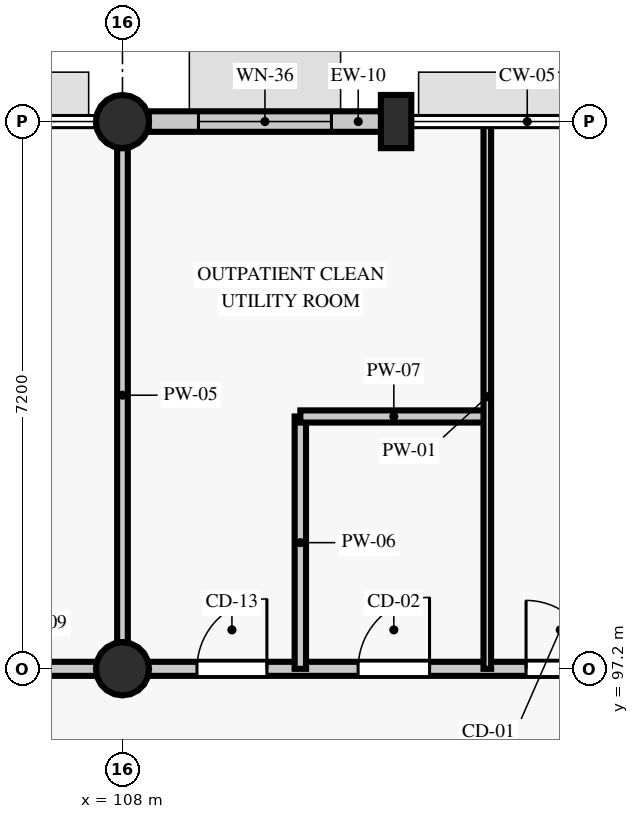
"""IFC4 building model, lengths in metres.
Left out: names, types, materials, properties, quantities, classifications, styles, units other than length and angle.
Written with IfcOpenShell. Run it as: python <this file> out.ifc"""

import sys

from ifc_helpers import new_model, si_unit, direction, frame, frame_2d, origin, origin_2d, place, context, subcontext, project, spatial, rectangle, circle, extrude, element, fill, save


model = new_model("IFC4")
c1 = context("Model", 3, precision=1e-05, world=origin(), true_north=direction((0.0, 1.0)))
c2 = subcontext(c1, "Body", "Model", "MODEL_VIEW")
j1 = project(units=[si_unit("LENGTHUNIT", "METRE"), si_unit("PLANEANGLEUNIT", "RADIAN")], contexts=[c1])
p1 = place(None, origin())
s1 = spatial("IfcSite", under=j1, at=p1, CompositionType="ELEMENT")
p2 = place(p1, origin())
s2 = spatial("IfcBuilding", under=s1, at=p2, CompositionType="ELEMENT")
p3 = place(p2, origin())
s3 = spatial("IfcBuildingStorey", under=s2, at=p3, CompositionType="ELEMENT", Elevation=0.0)
for number, where, z_axis, x_axis in (
    (1, (108.0, 97.2, 0.0), (0.0, 0.0, 1.0), (1.0, 0.0, 0.0)),
    (2, (108.0, 104.4, 0.0), (0.0, 0.0, 1.0), (1.0, 0.0, 0.0)),
):
    element("IfcColumn", number, at=place(p3, frame(where, z_axis=z_axis, x_axis=x_axis)), inside=s3, PredefinedType="COLUMN", context=c2, shape_type="SweptSolid", body=[
        extrude(circle(Radius=0.35, at=origin_2d()), origin(), (0.0, 0.0, 1.0), 4.535),
    ])
p4 = place(p3, frame((111.6, 104.4, 0.0), z_axis=(0.0, 0.0, 1.0), x_axis=(1.0, 0.0, 0.0)))
e3 = element("IfcColumn", 3, at=p4, inside=s3, PredefinedType="PILASTER", context=c2, shape_type="SweptSolid", body=[
    extrude(rectangle(XDim=0.4, YDim=0.7, at=origin_2d()), origin(), (0.0, 0.0, 1.0), 4.535),
])
p5 = place(p3, frame((111.404, 104.4, 0.0), z_axis=(0.0, 0.0, 1.0), x_axis=(-1.0, 0.0, 0.0)))
e4 = element("IfcWall", 4, at=p5, inside=s3, PredefinedType="STANDARD", context=c2, shape_type="SweptSolid", body=[
    extrude(rectangle(XDim=3.059, YDim=0.27, at=frame_2d((1.53, 0.0))), origin(), (0.0, 0.0, 1.0), 2.9),
])
p6 = place(p5, frame((0.655, 0.0, 0.9)))
e5 = element("IfcOpeningElement", 5, at=p6, cuts=e4, PredefinedType="OPENING", context=c2, shape_type="SweptSolid", body=[
    extrude(rectangle(XDim=1.75, YDim=1.66, at=frame_2d((0.875, 0.83))), frame((0.0, 0.145, 0.0), z_axis=(0.0, -1.0, 0.0), x_axis=(1.0, 0.0, 0.0)), (0.0, 0.0, 1.0), 0.29),
])
p7 = place(p3, frame((93.95, 97.2, 0.0), z_axis=(0.0, 0.0, 1.0), x_axis=(1.0, 0.0, 0.0)))
e6 = element("IfcWall", 6, at=p7, inside=s3, PredefinedType="PARTITIONING", context=c2, shape_type="SweptSolid", body=[
    extrude(rectangle(XDim=28.1, YDim=0.185, at=frame_2d((14.05, 0.0))), origin(), (0.0, 0.0, 1.0), 3.785),
])
p8 = place(p7, frame((2.837, 0.0, 0.0)))
e7 = element("IfcOpeningElement", 7, at=p8, cuts=e6, PredefinedType="OPENING", context=c2, shape_type="SweptSolid", body=[
    extrude(rectangle(XDim=1.05, YDim=2.13, at=frame_2d((0.525, 1.065))), frame((0.0, 0.103, 0.0), z_axis=(0.0, -1.0, 0.0), x_axis=(1.0, 0.0, 0.0)), (0.0, 0.0, 1.0), 0.205),
])
p9 = place(p7, frame((7.679, 0.0, 0.0)))
e8 = element("IfcOpeningElement", 8, at=p9, cuts=e6, PredefinedType="OPENING", context=c2, shape_type="SweptSolid", body=[
    extrude(rectangle(XDim=1.1, YDim=2.13, at=frame_2d((0.55, 1.065))), frame((0.0, 0.103, 0.0), z_axis=(0.0, -1.0, 0.0), x_axis=(1.0, 0.0, 0.0)), (0.0, 0.0, 1.0), 0.205),
])
p10 = place(p7, frame((9.747, 0.0, 0.0)))
e9 = element("IfcOpeningElement", 9, at=p10, cuts=e6, PredefinedType="OPENING", context=c2, shape_type="SweptSolid", body=[
    extrude(rectangle(XDim=1.15, YDim=2.13, at=frame_2d((0.575, 1.065))), frame((0.0, 0.103, 0.0), z_axis=(0.0, -1.0, 0.0), x_axis=(1.0, 0.0, 0.0)), (0.0, 0.0, 1.0), 0.205),
])
p11 = place(p7, frame((15.03, 0.0, 0.0)))
e10 = element("IfcOpeningElement", 10, at=p11, cuts=e6, PredefinedType="OPENING", context=c2, shape_type="SweptSolid", body=[
    extrude(rectangle(XDim=0.92, YDim=2.18, at=frame_2d((0.46, 1.09))), frame((0.0, 0.103, 0.0), z_axis=(0.0, -1.0, 0.0), x_axis=(1.0, 0.0, 0.0)), (0.0, 0.0, 1.0), 0.205),
])
p12 = place(p7, frame((17.15, 0.0, 0.0)))
e11 = element("IfcOpeningElement", 11, at=p12, cuts=e6, PredefinedType="OPENING", context=c2, shape_type="SweptSolid", body=[
    extrude(rectangle(XDim=0.94, YDim=2.08, at=frame_2d((0.47, 1.04))), frame((0.0, 0.103, 0.0), z_axis=(0.0, -1.0, 0.0), x_axis=(1.0, 0.0, 0.0)), (0.0, 0.0, 1.0), 0.205),
])
p13 = place(p7, frame((19.36, 0.0, 0.0)))
e12 = element("IfcOpeningElement", 12, at=p13, cuts=e6, PredefinedType="OPENING", context=c2, shape_type="SweptSolid", body=[
    extrude(rectangle(XDim=0.9, YDim=2.08, at=frame_2d((0.45, 1.04))), frame((0.0, 0.103, 0.0), z_axis=(0.0, -1.0, 0.0), x_axis=(1.0, 0.0, 0.0)), (0.0, 0.0, 1.0), 0.205),
])
p14 = place(p7, frame((23.167, 0.0, 0.0)))
e13 = element("IfcOpeningElement", 13, at=p14, cuts=e6, PredefinedType="OPENING", context=c2, shape_type="SweptSolid", body=[
    extrude(rectangle(XDim=1.08, YDim=2.18, at=frame_2d((0.54, 1.09))), frame((0.0, 0.103, 0.0), z_axis=(0.0, -1.0, 0.0), x_axis=(1.0, 0.0, 0.0)), (0.0, 0.0, 1.0), 0.205),
])
p15 = place(p7, frame((25.072, 0.0, 0.0)))
e14 = element("IfcOpeningElement", 14, at=p15, cuts=e6, PredefinedType="OPENING", context=c2, shape_type="SweptSolid", body=[
    extrude(rectangle(XDim=1.13, YDim=2.18, at=frame_2d((0.565, 1.09))), frame((0.0, 0.103, 0.0), z_axis=(0.0, -1.0, 0.0), x_axis=(1.0, 0.0, 0.0)), (0.0, 0.0, 1.0), 0.205),
])
p16 = place(p3, frame((108.0, 97.55, 0.0), z_axis=(0.0, 0.0, 1.0), x_axis=(0.0, 1.0, 0.0)))
e15 = element("IfcWall", 15, at=p16, inside=s3, PredefinedType="PARTITIONING", context=c2, shape_type="SweptSolid", body=[
    extrude(rectangle(XDim=6.5, YDim=0.14, at=frame_2d((3.25, 0.0))), origin(), (0.0, 0.0, 1.0), 3.985),
])
p17 = place(p3, frame((110.34, 97.2, 0.0), z_axis=(0.0, 0.0, 1.0), x_axis=(0.0, 1.0, 0.0)))
e16 = element("IfcWall", 16, at=p17, inside=s3, PredefinedType="PARTITIONING", context=c2, shape_type="SweptSolid", body=[
    extrude(rectangle(XDim=3.32, YDim=0.15, at=frame_2d((1.66, 0.0))), origin(), (0.0, 0.0, 1.0), 3.785),
])
p18 = place(p3, frame((110.34, 100.52, 0.0), z_axis=(0.0, 0.0, 1.0), x_axis=(1.0, 0.0, 0.0)))
e17 = element("IfcWall", 17, at=p18, inside=s3, PredefinedType="PARTITIONING", context=c2, shape_type="SweptSolid", body=[
    extrude(rectangle(XDim=2.46, YDim=0.16, at=frame_2d((1.23, 0.0))), origin(), (0.0, 0.0, 1.0), 4.535),
])
p19 = place(p3, frame((112.8, 97.2, 0.0), z_axis=(0.0, 0.0, 1.0), x_axis=(0.0, 1.0, 0.0)))
e18 = element("IfcWall", 18, at=p19, inside=s3, PredefinedType="PARTITIONING", context=c2, shape_type="SweptSolid", body=[
    extrude(rectangle(XDim=7.16, YDim=0.1, at=frame_2d((3.58, 0.0))), origin(), (0.0, 0.0, 1.0), 3.785),
])
p20 = place(p6, origin())
e19 = element("IfcWindow", 19, at=p20, inside=s3, PartitioningType="SINGLE_PANEL", PredefinedType="WINDOW", context=c2, shape_type="SweptSolid", body=[
    extrude(rectangle(XDim=1.75, YDim=1.66, at=frame_2d((0.875, 0.83))), frame((0.0, 0.03, 0.0), z_axis=(0.0, -1.0, 0.0), x_axis=(1.0, 0.0, 0.0)), (0.0, 0.0, 1.0), 0.06),
])
fill(e5, e19)
p21 = place(p11, origin())
e20 = element("IfcDoor", 20, at=p21, inside=s3, OperationType="SINGLE_SWING_RIGHT", PredefinedType="DOOR", context=c2, shape_type="SweptSolid", body=[
    extrude(rectangle(XDim=0.92, YDim=2.18, at=frame_2d((0.46, 1.09))), frame((0.0, 0.025, 0.0), z_axis=(0.0, -1.0, 0.0), x_axis=(1.0, 0.0, 0.0)), (0.0, 0.0, 1.0), 0.05),
])
fill(e10, e20)
p22 = place(p12, origin())
e21 = element("IfcDoor", 21, at=p22, inside=s3, OperationType="SINGLE_SWING_RIGHT", PredefinedType="DOOR", context=c2, shape_type="SweptSolid", body=[
    extrude(rectangle(XDim=0.94, YDim=2.08, at=frame_2d((0.47, 1.04))), frame((0.0, 0.025, 0.0), z_axis=(0.0, -1.0, 0.0), x_axis=(1.0, 0.0, 0.0)), (0.0, 0.0, 1.0), 0.05),
])
fill(e11, e21)
p23 = place(p13, origin())
e22 = element("IfcDoor", 22, at=p23, inside=s3, OperationType="SINGLE_SWING_LEFT", PredefinedType="DOOR", context=c2, shape_type="SweptSolid", body=[
    extrude(rectangle(XDim=0.9, YDim=2.08, at=frame_2d((0.45, 1.04))), frame((0.0, 0.025, 0.0), z_axis=(0.0, -1.0, 0.0), x_axis=(1.0, 0.0, 0.0)), (0.0, 0.0, 1.0), 0.05),
])
fill(e12, e22)
save(model, sys.argv[1])
